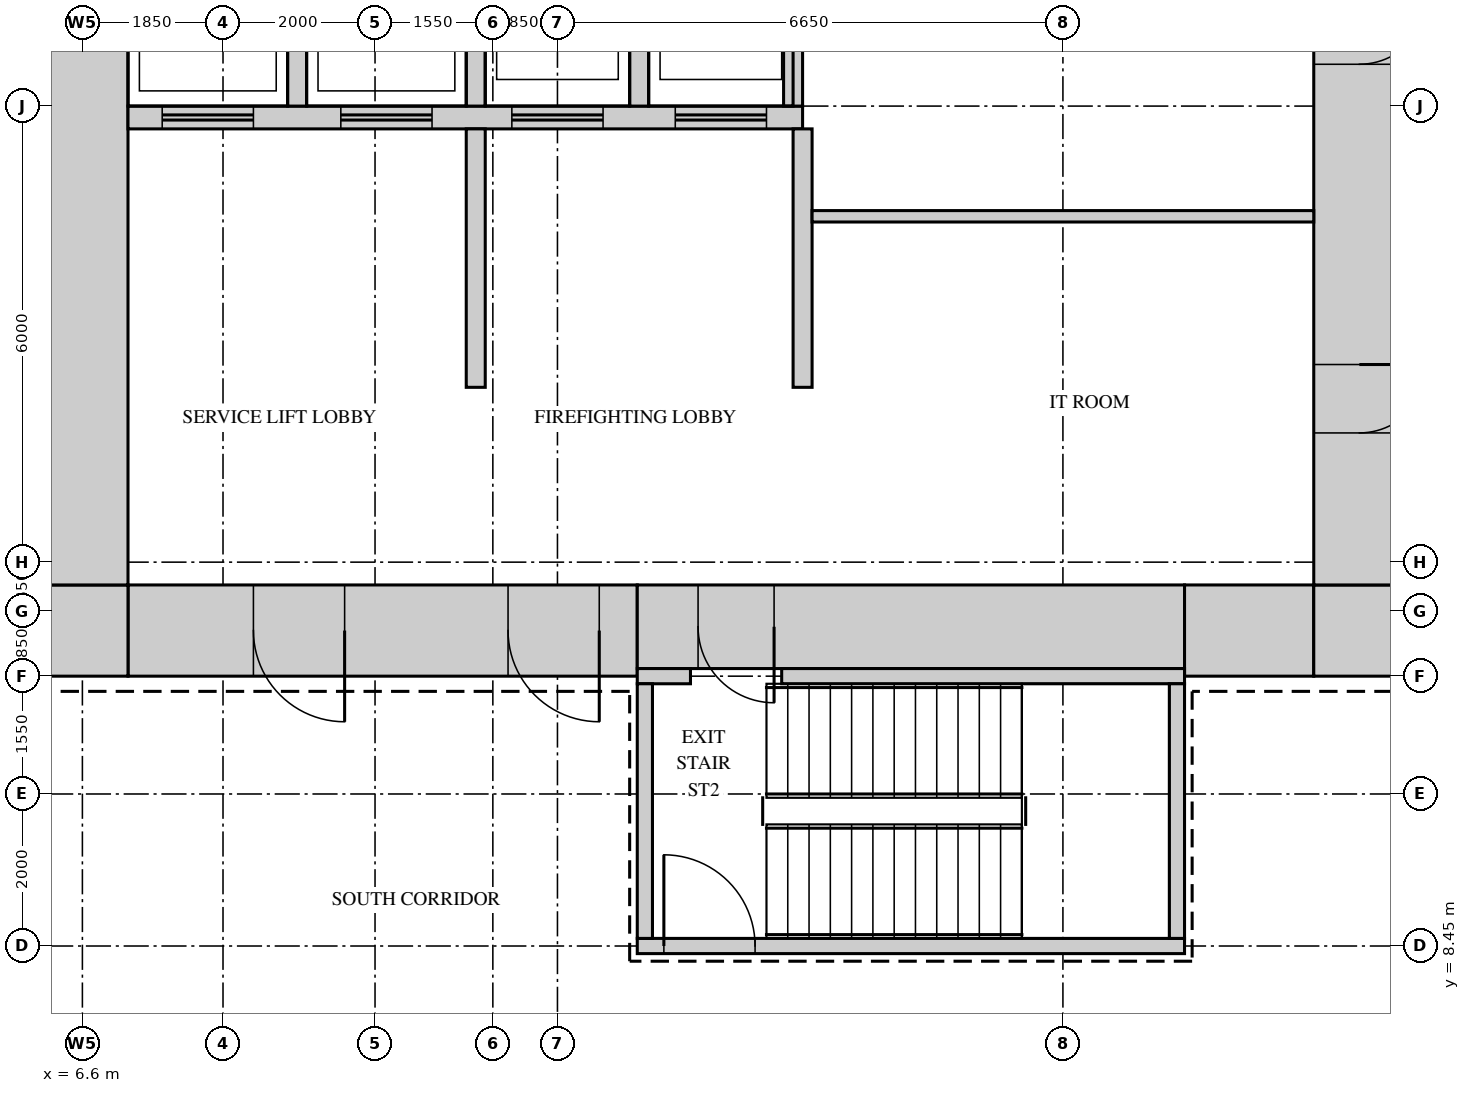
"""IFC4 building model, lengths in metres.
Left out: names, types, materials, properties, quantities, classifications, styles, units other than length and angle.
Written with IfcOpenShell. Run it as: python <this file> out.ifc"""

import sys

from ifc_helpers import new_model, si_unit, direction, frame, frame_2d, origin, place, context, subcontext, project, spatial, rectangle, extrude, source, transform, mapped, element, fill, save


model = new_model("IFC4")
c1 = context("Model", 3, precision=1e-05, world=origin(), true_north=direction((0.0, 1.0)))
c2 = subcontext(c1, "Body", "Model", "MODEL_VIEW")
j1 = project(units=[si_unit("LENGTHUNIT", "METRE"), si_unit("PLANEANGLEUNIT", "RADIAN")], contexts=[c1])
p1 = place(None, origin())
s1 = spatial("IfcSite", under=j1, at=p1, CompositionType="ELEMENT")
p2 = place(p1, origin())
s2 = spatial("IfcBuilding", under=s1, at=p2, CompositionType="ELEMENT")
p3 = place(p2, frame((0.0, 0.0, 91.5)))
s3 = spatial("IfcBuildingStorey", under=s2, at=p3, CompositionType="ELEMENT", Elevation=91.5)
m1 = source(origin(), c2, "Body", "SweptSolid", [
    extrude(rectangle(XDim=6.7, YDim=1.2, at=frame_2d((3.35, 0.0))), origin(), (0.0, 0.0, 1.0), 4.2),
])
p4 = place(p3, frame((7.2, 12.6, 0.0), z_axis=(0.0, 0.0, 1.0), x_axis=(1.0, 0.0, 0.0)))
e1 = element("IfcWall", 1, at=p4, inside=s3, PredefinedType="SHEAR", context=c2, shape_type="MappedRepresentation", body=[
    mapped(m1, transform((0.0, 0.0, 0.0))),
])
m2 = source(origin(), c2, "Body", "SweptSolid", [
    extrude(rectangle(XDim=1.2, YDim=2.1, at=frame_2d((0.6, 1.05))), frame((0.0, 0.61, 0.0), z_axis=(0.0, -1.0, 0.0), x_axis=(1.0, 0.0, 0.0)), (0.0, 0.0, 1.0), 1.22),
])
p5 = place(p4, frame((5.0, 0.0, 0.0)))
e2 = element("IfcOpeningElement", 2, at=p5, cuts=e1, PredefinedType="OPENING", context=c2, shape_type="MappedRepresentation", body=[
    mapped(m2, transform((0.0, 0.0, 0.0))),
])
p6 = place(p4, frame((1.65, 0.0, 0.0)))
e3 = element("IfcOpeningElement", 3, at=p6, cuts=e1, PredefinedType="OPENING", context=c2, shape_type="MappedRepresentation", body=[
    mapped(m2, transform((0.0, 0.0, 0.0))),
])
m3 = source(origin(), c2, "Body", "SweptSolid", [
    extrude(rectangle(XDim=7.2, YDim=1.1, at=frame_2d((3.6, 0.0))), origin(), (0.0, 0.0, 1.0), 4.2),
])
p7 = place(p3, frame((13.9, 12.65, 0.0), z_axis=(0.0, 0.0, 1.0), x_axis=(1.0, 0.0, 0.0)))
e4 = element("IfcWall", 4, at=p7, inside=s3, PredefinedType="SHEAR", context=c2, shape_type="MappedRepresentation", body=[
    mapped(m3, transform((0.0, 0.0, 0.0))),
])
m4 = source(origin(), c2, "Body", "SweptSolid", [
    extrude(rectangle(XDim=1.0, YDim=2.1, at=frame_2d((0.5, 1.05))), frame((0.0, 0.56, 0.0), z_axis=(0.0, -1.0, 0.0), x_axis=(1.0, 0.0, 0.0)), (0.0, 0.0, 1.0), 1.12),
])
p8 = place(p7, frame((0.8, 0.0, 0.0)))
e5 = element("IfcOpeningElement", 5, at=p8, cuts=e4, PredefinedType="OPENING", context=c2, shape_type="MappedRepresentation", body=[
    mapped(m4, transform((0.0, 0.0, 0.0))),
])
m5 = source(origin(), c2, "Body", "SweptSolid", [
    extrude(rectangle(XDim=1.7, YDim=1.2, at=frame_2d((0.85, 0.0))), origin(), (0.0, 0.0, 1.0), 4.2),
])
p9 = place(p3, frame((21.1, 12.6, 0.0), z_axis=(0.0, 0.0, 1.0), x_axis=(1.0, 0.0, 0.0)))
e6 = element("IfcWall", 6, at=p9, inside=s3, PredefinedType="SHEAR", context=c2, shape_type="MappedRepresentation", body=[
    mapped(m5, transform((0.0, 0.0, 0.0))),
])
m6 = source(origin(), c2, "Body", "SweptSolid", [
    extrude(rectangle(XDim=1.2, YDim=1.2, at=frame_2d((0.6, 0.0))), origin(), (0.0, 0.0, 1.0), 4.2),
])
for number, where, z_axis, x_axis in (
    (7, (22.8, 12.6, 0.0), (0.0, 0.0, 1.0), (1.0, 0.0, 0.0)),
    (8, (6.0, 12.6, 0.0), (0.0, 0.0, 1.0), (1.0, 0.0, 0.0)),
):
    element("IfcWall", number, at=place(p3, frame(where, z_axis=z_axis, x_axis=x_axis)), inside=s3, PredefinedType="SHEAR", context=c2, shape_type="MappedRepresentation", body=[
        mapped(m6, transform((0.0, 0.0, 0.0))),
    ])
m7 = source(origin(), c2, "Body", "SweptSolid", [
    extrude(rectangle(XDim=27.6, YDim=1.2, at=frame_2d((13.8, 0.0))), origin(), (0.0, 0.0, 1.0), 4.2),
])
p10 = place(p3, frame((23.4, 13.2, 0.0), z_axis=(0.0, 0.0, 1.0), x_axis=(0.0, 1.0, 0.0)))
e9 = element("IfcWall", 9, at=p10, inside=s3, PredefinedType="SHEAR", context=c2, shape_type="MappedRepresentation", body=[
    mapped(m7, transform((0.0, 0.0, 0.0))),
])
m8 = source(origin(), c2, "Body", "SweptSolid", [
    extrude(rectangle(XDim=1.8, YDim=2.1, at=frame_2d((0.9, 1.05))), frame((0.0, 0.61, 0.0), z_axis=(0.0, -1.0, 0.0), x_axis=(1.0, 0.0, 0.0)), (0.0, 0.0, 1.0), 1.22),
])
p11 = place(p10, frame((22.4, 0.0, 0.0)))
e10 = element("IfcOpeningElement", 10, at=p11, cuts=e9, PredefinedType="OPENING", context=c2, shape_type="MappedRepresentation", body=[
    mapped(m8, transform((0.0, 0.0, 0.0))),
])
p12 = place(p10, frame((12.9, 0.0, 0.0)))
e11 = element("IfcOpeningElement", 11, at=p12, cuts=e9, PredefinedType="OPENING", context=c2, shape_type="MappedRepresentation", body=[
    mapped(m2, transform((0.0, 0.0, 0.0))),
])
m9 = source(origin(), c2, "Body", "SweptSolid", [
    extrude(rectangle(XDim=0.9, YDim=2.1, at=frame_2d((0.45, 1.05))), frame((0.0, 0.61, 0.0), z_axis=(0.0, -1.0, 0.0), x_axis=(1.0, 0.0, 0.0)), (0.0, 0.0, 1.0), 1.22),
])
p13 = place(p10, frame((2.0, 0.0, 0.0)))
e12 = element("IfcOpeningElement", 12, at=p13, cuts=e9, PredefinedType="OPENING", context=c2, shape_type="MappedRepresentation", body=[
    mapped(m9, transform((0.0, 0.0, 0.0))),
])
p14 = place(p10, frame((6.85, 0.0, 0.0)))
e13 = element("IfcOpeningElement", 13, at=p14, cuts=e9, PredefinedType="OPENING", context=c2, shape_type="MappedRepresentation", body=[
    mapped(m9, transform((0.0, 0.0, 0.0))),
])
p15 = place(p3, frame((6.6, 13.2, 0.0), z_axis=(0.0, 0.0, 1.0), x_axis=(0.0, 1.0, 0.0)))
e14 = element("IfcWall", 14, at=p15, inside=s3, PredefinedType="SHEAR", context=c2, shape_type="MappedRepresentation", body=[
    mapped(m7, transform((0.0, 0.0, 0.0))),
])
m10 = source(origin(), c2, "Body", "SweptSolid", [
    extrude(rectangle(XDim=0.7, YDim=0.2, at=frame_2d((0.35, 0.0))), origin(), (0.0, 0.0, 1.0), 4.2),
])
p16 = place(p3, frame((13.9, 12.0, 0.0), z_axis=(0.0, 0.0, 1.0), x_axis=(1.0, 0.0, 0.0)))
e15 = element("IfcWall", 15, at=p16, inside=s3, PredefinedType="SHEAR", context=c2, shape_type="MappedRepresentation", body=[
    mapped(m10, transform((0.0, 0.0, 0.0))),
])
m11 = source(origin(), c2, "Body", "SweptSolid", [
    extrude(rectangle(XDim=5.3, YDim=0.2, at=frame_2d((2.65, 0.0))), origin(), (0.0, 0.0, 1.0), 4.2),
])
p17 = place(p3, frame((15.8, 12.0, 0.0), z_axis=(0.0, 0.0, 1.0), x_axis=(1.0, 0.0, 0.0)))
e16 = element("IfcWall", 16, at=p17, inside=s3, PredefinedType="SHEAR", context=c2, shape_type="MappedRepresentation", body=[
    mapped(m11, transform((0.0, 0.0, 0.0))),
])
m12 = source(origin(), c2, "Body", "SweptSolid", [
    extrude(rectangle(XDim=7.2, YDim=0.2, at=frame_2d((3.6, 0.0))), origin(), (0.0, 0.0, 1.0), 4.2),
])
p18 = place(p3, frame((13.9, 8.45, 0.0), z_axis=(0.0, 0.0, 1.0), x_axis=(1.0, 0.0, 0.0)))
e17 = element("IfcWall", 17, at=p18, inside=s3, PredefinedType="SHEAR", context=c2, shape_type="MappedRepresentation", body=[
    mapped(m12, transform((0.0, 0.0, 0.0))),
])
m13 = source(origin(), c2, "Body", "SweptSolid", [
    extrude(rectangle(XDim=1.2, YDim=2.1, at=frame_2d((0.6, 1.05))), frame((0.0, 0.11, 0.0), z_axis=(0.0, -1.0, 0.0), x_axis=(1.0, 0.0, 0.0)), (0.0, 0.0, 1.0), 0.22),
])
p19 = place(p18, frame((0.35, 0.0, 0.0)))
e18 = element("IfcOpeningElement", 18, at=p19, cuts=e17, PredefinedType="OPENING", context=c2, shape_type="MappedRepresentation", body=[
    mapped(m13, transform((0.0, 0.0, 0.0))),
])
m14 = source(origin(), c2, "Body", "SweptSolid", [
    extrude(rectangle(XDim=3.35, YDim=0.2, at=frame_2d((1.675, 0.0))), origin(), (0.0, 0.0, 1.0), 4.2),
])
for number, where, z_axis, x_axis in (
    (19, (21.0, 8.55, 0.0), (0.0, 0.0, 1.0), (0.0, 1.0, 0.0)),
    (20, (14.0, 8.55, 0.0), (0.0, 0.0, 1.0), (0.0, 1.0, 0.0)),
):
    element("IfcWall", number, at=place(p3, frame(where, z_axis=z_axis, x_axis=x_axis)), inside=s3, PredefinedType="SHEAR", context=c2, shape_type="MappedRepresentation", body=[
        mapped(m14, transform((0.0, 0.0, 0.0))),
    ])
m15 = source(origin(), c2, "Body", "SweptSolid", [
    extrude(rectangle(XDim=8.875, YDim=0.3, at=frame_2d((4.438, 0.0))), origin(), (0.0, 0.0, 1.0), 4.2),
])
p20 = place(p3, frame((7.2, 19.35, 0.0), z_axis=(0.0, 0.0, 1.0), x_axis=(1.0, 0.0, 0.0)))
e21 = element("IfcWall", 21, at=p20, inside=s3, PredefinedType="STANDARD", context=c2, shape_type="MappedRepresentation", body=[
    mapped(m15, transform((0.0, 0.0, 0.0))),
])
m16 = source(origin(), c2, "Body", "SweptSolid", [
    extrude(rectangle(XDim=1.2, YDim=2.1, at=frame_2d((0.6, 1.05))), frame((0.0, 0.16, 0.0), z_axis=(0.0, -1.0, 0.0), x_axis=(1.0, 0.0, 0.0)), (0.0, 0.0, 1.0), 0.32),
])
p21 = place(p20, frame((0.45, 0.0, 0.0)))
e22 = element("IfcOpeningElement", 22, at=p21, cuts=e21, PredefinedType="OPENING", context=c2, shape_type="MappedRepresentation", body=[
    mapped(m16, transform((0.0, 0.0, 0.0))),
])
p22 = place(p20, frame((2.8, 0.0, 0.0)))
e23 = element("IfcOpeningElement", 23, at=p22, cuts=e21, PredefinedType="OPENING", context=c2, shape_type="MappedRepresentation", body=[
    mapped(m16, transform((0.0, 0.0, 0.0))),
])
p23 = place(p20, frame((5.05, 0.0, 0.0)))
e24 = element("IfcOpeningElement", 24, at=p23, cuts=e21, PredefinedType="OPENING", context=c2, shape_type="MappedRepresentation", body=[
    mapped(m16, transform((0.0, 0.0, 0.0))),
])
p24 = place(p20, frame((7.2, 0.0, 0.0)))
e25 = element("IfcOpeningElement", 25, at=p24, cuts=e21, PredefinedType="OPENING", context=c2, shape_type="MappedRepresentation", body=[
    mapped(m16, transform((0.0, 0.0, 0.0))),
])
m17 = source(origin(), c2, "Body", "SweptSolid", [
    extrude(rectangle(XDim=3.1, YDim=0.25, at=frame_2d((1.55, 0.0))), origin(), (0.0, 0.0, 1.0), 4.2),
])
for number, where, z_axis, x_axis in (
    (26, (9.425, 19.5, 0.0), (0.0, 0.0, 1.0), (0.0, 1.0, 0.0)),
    (27, (11.775, 19.5, 0.0), (0.0, 0.0, 1.0), (0.0, 1.0, 0.0)),
    (28, (13.925, 19.5, 0.0), (0.0, 0.0, 1.0), (0.0, 1.0, 0.0)),
    (29, (15.95, 19.5, 0.0), (0.0, 0.0, 1.0), (0.0, 1.0, 0.0)),
):
    element("IfcWall", number, at=place(p3, frame(where, z_axis=z_axis, x_axis=x_axis)), inside=s3, PredefinedType="STANDARD", context=c2, shape_type="MappedRepresentation", body=[
        mapped(m17, transform((0.0, 0.0, 0.0))),
    ])
m18 = source(origin(), c2, "Body", "SweptSolid", [
    extrude(rectangle(XDim=3.4, YDim=0.25, at=frame_2d((1.7, 0.0))), origin(), (0.0, 0.0, 1.0), 4.2),
])
for number, where, z_axis, x_axis in (
    (30, (16.075, 15.8, 0.0), (0.0, 0.0, 1.0), (0.0, 1.0, 0.0)),
    (31, (11.775, 15.8, 0.0), (0.0, 0.0, 1.0), (0.0, 1.0, 0.0)),
):
    element("IfcWall", number, at=place(p3, frame(where, z_axis=z_axis, x_axis=x_axis)), inside=s3, PredefinedType="STANDARD", context=c2, shape_type="MappedRepresentation", body=[
        mapped(m18, transform((0.0, 0.0, 0.0))),
    ])
m19 = source(origin(), c2, "Body", "SweptSolid", [
    extrude(rectangle(XDim=6.6, YDim=0.15, at=frame_2d((3.3, 0.0))), origin(), (0.0, 0.0, 1.0), 4.3),
])
p25 = place(p3, frame((16.2, 18.05, 0.0), z_axis=(0.0, 0.0, 1.0), x_axis=(1.0, 0.0, 0.0)))
e32 = element("IfcWall", 32, at=p25, inside=s3, PredefinedType="PARTITIONING", context=c2, shape_type="MappedRepresentation", body=[
    mapped(m19, transform((0.0, 0.0, 0.0))),
])
m20 = source(origin(), c2, "Body", "SweptSolid", [
    extrude(rectangle(XDim=0.9, YDim=2.1, at=frame_2d((0.45, 1.05))), frame((0.0, 0.55, 0.0), z_axis=(0.0, -1.0, 0.0), x_axis=(1.0, 0.0, 0.0)), (0.0, 0.0, 1.0), 1.1),
])
p26 = place(p13, origin())
e33 = element("IfcDoor", 33, at=p26, inside=s3, OperationType="SINGLE_SWING_RIGHT", PredefinedType="DOOR", context=c2, shape_type="MappedRepresentation", body=[
    mapped(m20, transform((0.0, 0.0, 0.0))),
])
fill(e12, e33)
p27 = place(p14, origin())
e34 = element("IfcDoor", 34, at=p27, inside=s3, OperationType="SINGLE_SWING_RIGHT", PredefinedType="DOOR", context=c2, shape_type="MappedRepresentation", body=[
    mapped(m20, transform((0.0, 0.0, 0.0))),
])
fill(e13, e34)
m21 = source(origin(), c2, "Body", "SweptSolid", [
    extrude(rectangle(XDim=1.2, YDim=2.1, at=frame_2d((0.6, 1.05))), frame((0.0, 0.55, 0.0), z_axis=(0.0, -1.0, 0.0), x_axis=(1.0, 0.0, 0.0)), (0.0, 0.0, 1.0), 1.1),
])
p28 = place(p5, origin())
e35 = element("IfcDoor", 35, at=p28, inside=s3, OperationType="SINGLE_SWING_RIGHT", PredefinedType="DOOR", context=c2, shape_type="MappedRepresentation", body=[
    mapped(m21, transform((0.0, 0.0, 0.0))),
])
fill(e2, e35)
p29 = place(p6, origin())
e36 = element("IfcDoor", 36, at=p29, inside=s3, OperationType="SINGLE_SWING_RIGHT", PredefinedType="DOOR", context=c2, shape_type="MappedRepresentation", body=[
    mapped(m21, transform((0.0, 0.0, 0.0))),
])
fill(e3, e36)
m22 = source(origin(), c2, "Body", "SweptSolid", [
    extrude(rectangle(XDim=1.0, YDim=2.1, at=frame_2d((0.5, 1.05))), frame((0.0, 0.5, 0.0), z_axis=(0.0, -1.0, 0.0), x_axis=(1.0, 0.0, 0.0)), (0.0, 0.0, 1.0), 1.0),
])
p30 = place(p8, origin())
e37 = element("IfcDoor", 37, at=p30, inside=s3, OperationType="SINGLE_SWING_RIGHT", PredefinedType="DOOR", context=c2, shape_type="MappedRepresentation", body=[
    mapped(m22, transform((0.0, 0.0, 0.0))),
])
fill(e5, e37)
m23 = source(origin(), c2, "Body", "SweptSolid", [
    extrude(rectangle(XDim=1.2, YDim=2.1, at=frame_2d((0.6, 1.05))), frame((0.0, 0.025, 0.0), z_axis=(0.0, -1.0, 0.0), x_axis=(1.0, 0.0, 0.0)), (0.0, 0.0, 1.0), 0.05),
])
p31 = place(p19, origin())
e38 = element("IfcDoor", 38, at=p31, inside=s3, OperationType="SINGLE_SWING_RIGHT", PredefinedType="DOOR", context=c2, shape_type="MappedRepresentation", body=[
    mapped(m23, transform((0.0, 0.0, 0.0))),
])
fill(e18, e38)
p32 = place(p21, origin())
e39 = element("IfcDoor", 39, at=p32, inside=s3, OperationType="DOUBLE_DOOR_SLIDING", PredefinedType="DOOR", context=c2, shape_type="MappedRepresentation", body=[
    mapped(m23, transform((0.0, 0.0, 0.0))),
])
fill(e22, e39)
p33 = place(p22, origin())
e40 = element("IfcDoor", 40, at=p33, inside=s3, OperationType="DOUBLE_DOOR_SLIDING", PredefinedType="DOOR", context=c2, shape_type="MappedRepresentation", body=[
    mapped(m23, transform((0.0, 0.0, 0.0))),
])
fill(e23, e40)
p34 = place(p23, origin())
e41 = element("IfcDoor", 41, at=p34, inside=s3, OperationType="DOUBLE_DOOR_SLIDING", PredefinedType="DOOR", context=c2, shape_type="MappedRepresentation", body=[
    mapped(m23, transform((0.0, 0.0, 0.0))),
])
fill(e24, e41)
p35 = place(p24, origin())
e42 = element("IfcDoor", 42, at=p35, inside=s3, OperationType="DOUBLE_DOOR_SLIDING", PredefinedType="DOOR", context=c2, shape_type="MappedRepresentation", body=[
    mapped(m23, transform((0.0, 0.0, 0.0))),
])
fill(e25, e42)
save(model, sys.argv[1])
